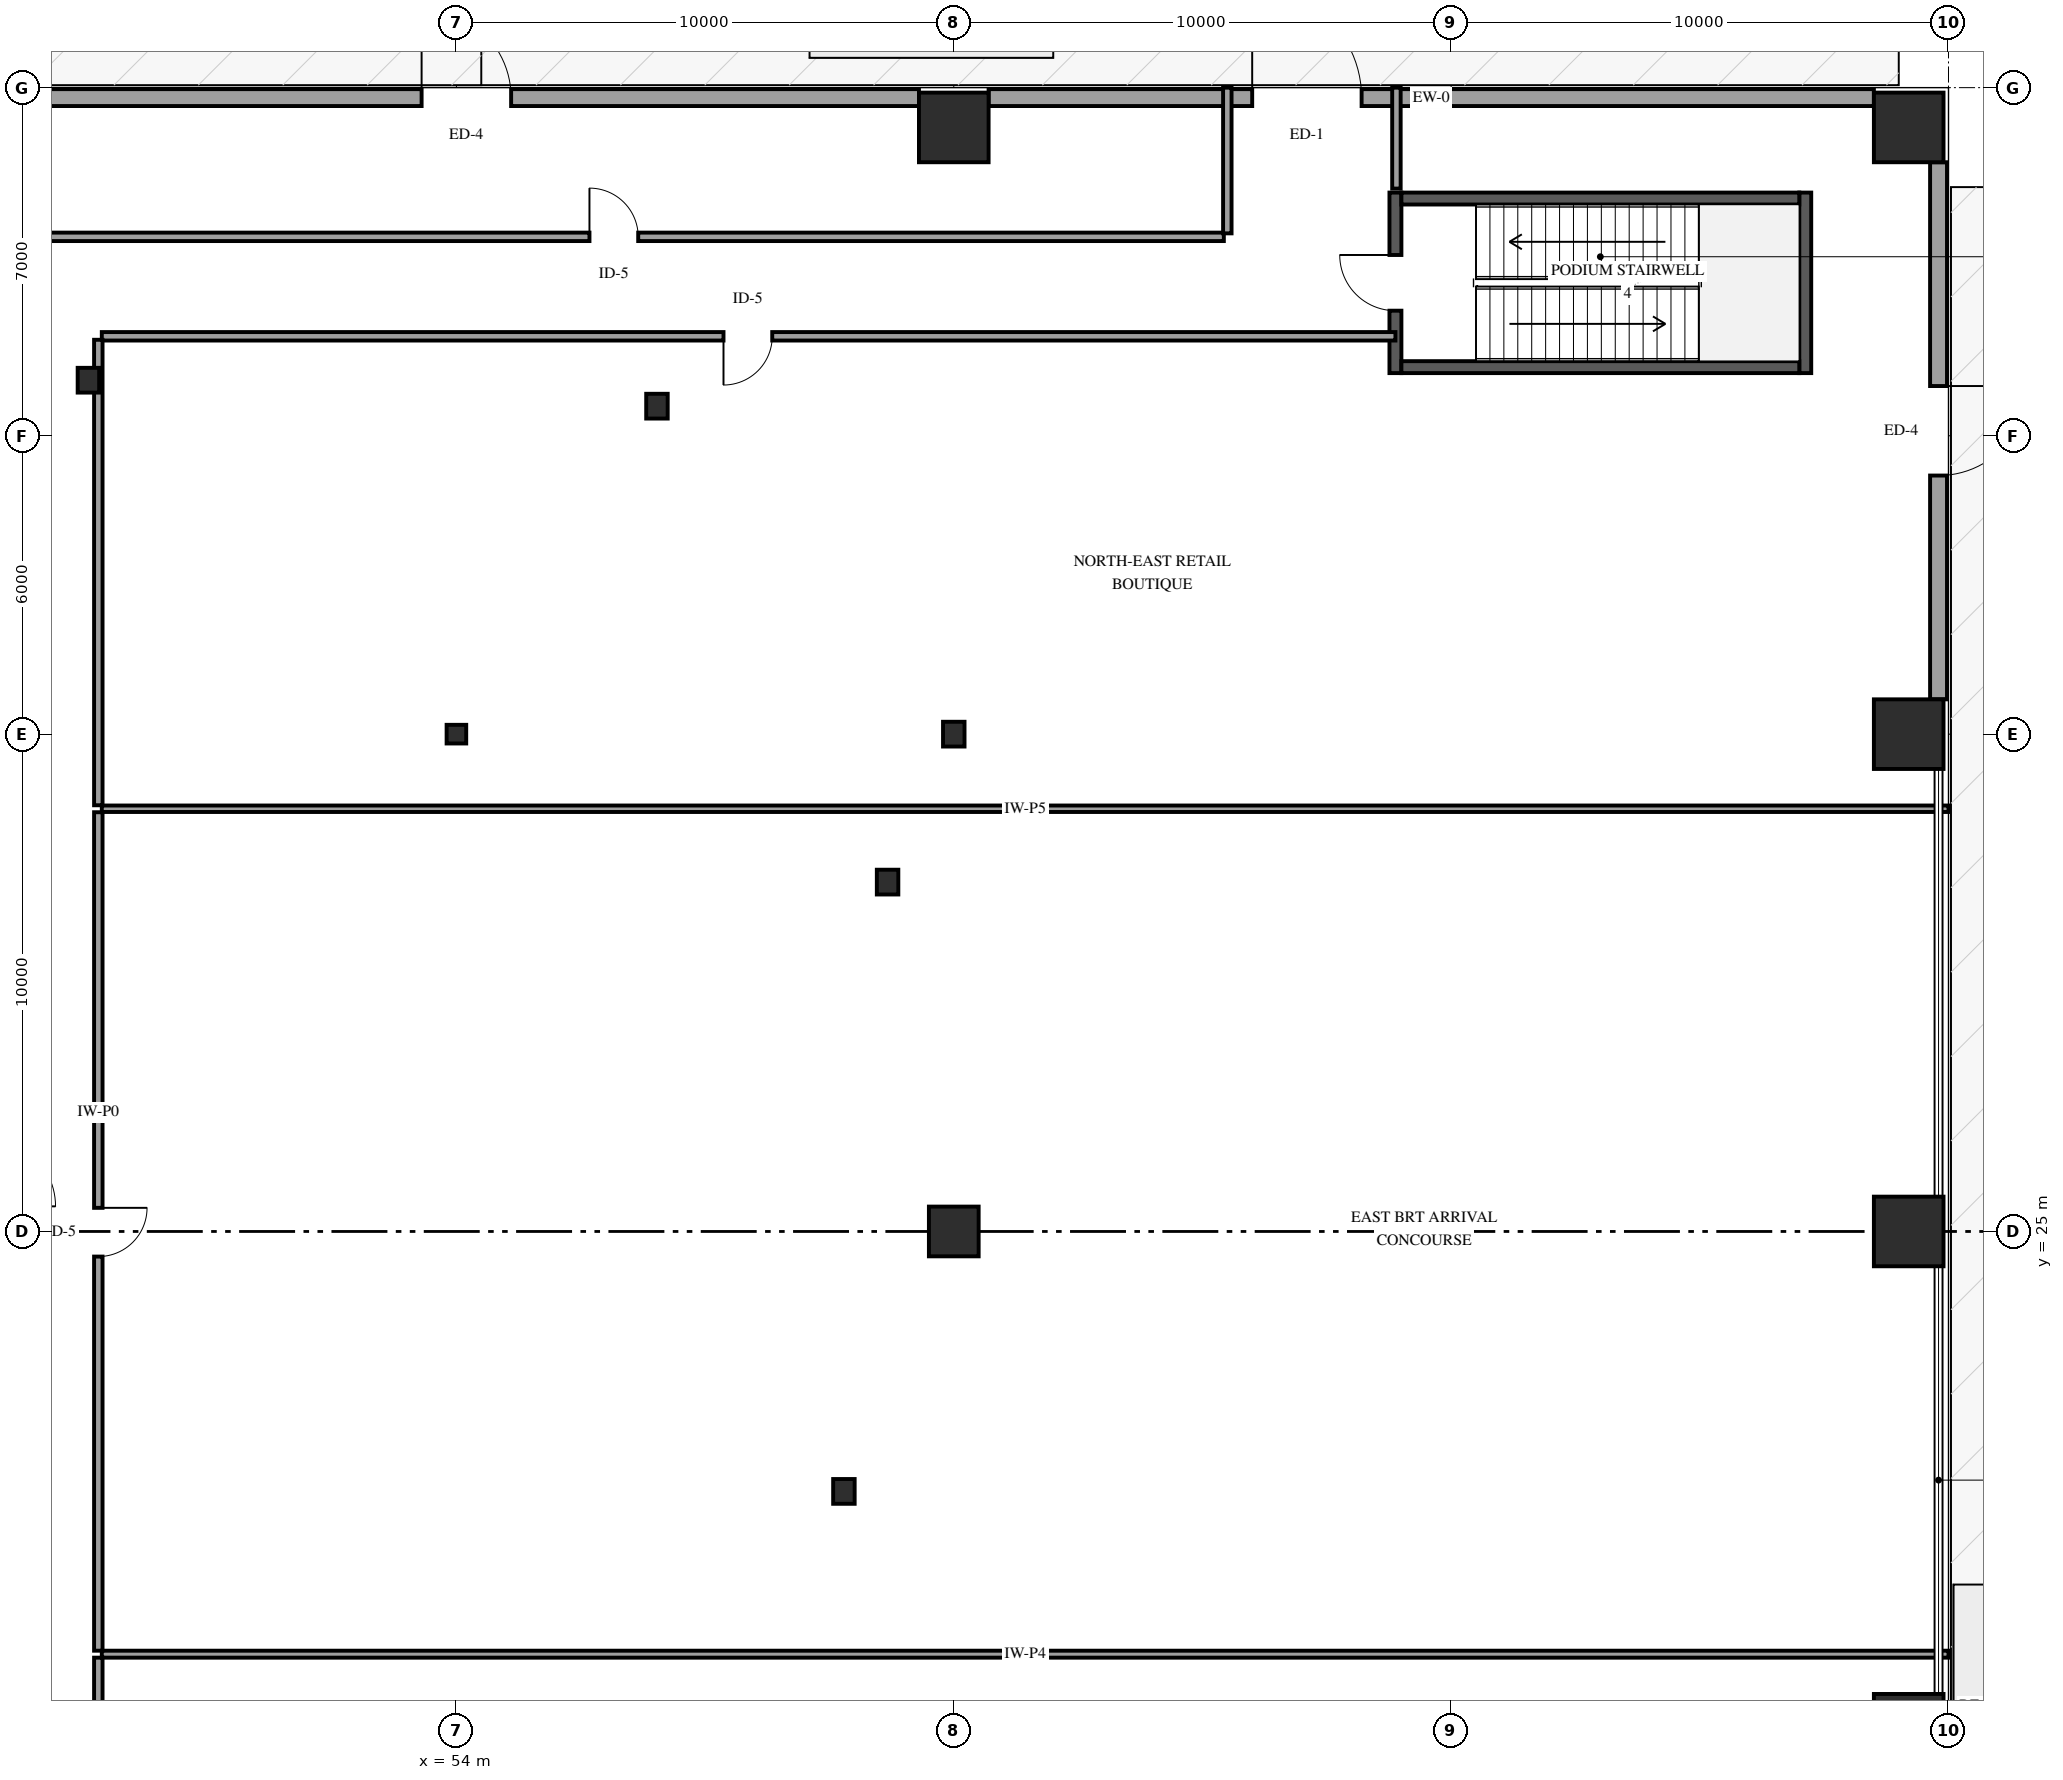
"""IFC4 building model, lengths in metres.
Left out: names, types, materials, properties, quantities, classifications, styles, units other than length and angle.
Written with IfcOpenShell. Run it as: python <this file> out.ifc"""

import sys

from ifc_helpers import new_model, si_unit, direction, frame, frame_2d, origin, origin_2d, place, context, subcontext, project, spatial, rectangle, i_section, extrude, element, fill, save


model = new_model("IFC4")
c1 = context("Model", 3, precision=1e-05, world=origin(), true_north=direction((0.0, 1.0)))
c2 = subcontext(c1, "Body", "Model", "MODEL_VIEW")
j1 = project(units=[si_unit("LENGTHUNIT", "METRE"), si_unit("PLANEANGLEUNIT", "RADIAN")], contexts=[c1])
p1 = place(None, origin())
s1 = spatial("IfcSite", under=j1, at=p1, CompositionType="ELEMENT")
p2 = place(p1, origin())
s2 = spatial("IfcBuilding", under=s1, at=p2, CompositionType="ELEMENT")
p3 = place(p2, origin())
s3 = spatial("IfcBuildingStorey", under=s2, at=p3, CompositionType="ELEMENT", Elevation=0.0)
p4 = place(p3, frame((72.88, 42.26, 0.0), z_axis=(0.0, 0.0, 1.0), x_axis=(0.0, 1.0, 0.0)))
e1 = element("IfcWall", 1, at=p4, inside=s3, PredefinedType="SHEAR", context=c2, shape_type="SweptSolid", body=[
    extrude(rectangle(XDim=3.63, YDim=0.24, at=frame_2d((1.815, 0.0))), origin(), (0.0, 0.0, 1.0), 6.0),
])
p5 = place(p4, frame((1.255, 0.0, 0.0)))
e2 = element("IfcOpeningElement", 2, at=p5, cuts=e1, PredefinedType="OPENING", context=c2, shape_type="SweptSolid", body=[
    extrude(rectangle(XDim=1.12, YDim=2.15, at=frame_2d((0.56, 1.075))), frame((0.0, 0.13, 0.0), z_axis=(0.0, -1.0, 0.0), x_axis=(1.0, 0.0, 0.0)), (0.0, 0.0, 1.0), 0.26),
])
p6 = place(p3, frame((81.12, 42.26, 0.0), z_axis=(0.0, 0.0, 1.0), x_axis=(0.0, 1.0, 0.0)))
e3 = element("IfcWall", 3, at=p6, inside=s3, PredefinedType="SHEAR", context=c2, shape_type="SweptSolid", body=[
    extrude(rectangle(XDim=3.63, YDim=0.24, at=frame_2d((1.815, 0.0))), origin(), (0.0, 0.0, 1.0), 6.0),
])
for number, where, z_axis, x_axis in (
    (4, (73.0, 42.38, 0.0), (0.0, 0.0, 1.0), (1.0, 0.0, 0.0)),
    (5, (73.0, 45.77, 0.0), (0.0, 0.0, 1.0), (1.0, 0.0, 0.0)),
):
    element("IfcWall", number, at=place(p3, frame(where, z_axis=z_axis, x_axis=x_axis)), inside=s3, PredefinedType="SHEAR", context=c2, shape_type="SweptSolid", body=[
        extrude(rectangle(XDim=8.0, YDim=0.24, at=frame_2d((4.0, 0.0))), origin(), (0.0, 0.0, 1.0), 6.0),
    ])
p7 = place(p3, frame((83.2, 15.0, 0.0), z_axis=(0.0, 0.0, 1.0), x_axis=(1.0, 0.0, 0.0)))
e6 = element("IfcColumn", 6, at=p7, inside=s3, PredefinedType="COLUMN", context=c2, shape_type="SweptSolid", body=[
    extrude(rectangle(XDim=1.4, YDim=1.4, at=origin_2d()), origin(), (0.0, 0.0, 1.0), 6.0),
])
p8 = place(p3, frame((64.0, 35.0, 0.0), z_axis=(0.0, 0.0, 1.0), x_axis=(1.0, 0.0, 0.0)))
e7 = element("IfcColumn", 7, at=p8, inside=s3, PredefinedType="COLUMN", context=c2, shape_type="SweptSolid", body=[
    extrude(i_section(OverallWidth=0.432, OverallDepth=0.498, WebThickness=0.056, FlangeThickness=0.089, FilletRadius=0.038, at=origin_2d()), origin(), (0.0, 0.0, 1.0), 6.0),
])
for number, where, z_axis, x_axis in (
    (8, (83.2, 35.0, 0.0), (0.0, 0.0, 1.0), (1.0, 0.0, 0.0)),
    (9, (64.0, 47.2, 0.0), (0.0, 0.0, 1.0), (1.0, 0.0, 0.0)),
    (10, (83.2, 47.2, 0.0), (0.0, 0.0, 1.0), (1.0, 0.0, 0.0)),
):
    element("IfcColumn", number, at=place(p3, frame(where, z_axis=z_axis, x_axis=x_axis)), inside=s3, PredefinedType="COLUMN", context=c2, shape_type="SweptSolid", body=[
        extrude(rectangle(XDim=1.4, YDim=1.4, at=origin_2d()), origin(), (0.0, 0.0, 1.0), 6.0),
    ])
p9 = place(p3, frame((64.0, 25.0, 0.0), z_axis=(0.0, 0.0, 1.0), x_axis=(1.0, 0.0, 0.0)))
e11 = element("IfcColumn", 11, at=p9, inside=s3, PredefinedType="COLUMN", context=c2, shape_type="SweptSolid", body=[
    extrude(rectangle(XDim=1.0, YDim=1.0, at=origin_2d()), origin(), (0.0, 0.0, 1.0), 6.0),
])
p10 = place(p3, frame((83.2, 25.0, 0.0), z_axis=(0.0, 0.0, 1.0), x_axis=(1.0, 0.0, 0.0)))
e12 = element("IfcColumn", 12, at=p10, inside=s3, PredefinedType="COLUMN", context=c2, shape_type="SweptSolid", body=[
    extrude(rectangle(XDim=1.4, YDim=1.4, at=origin_2d()), origin(), (0.0, 0.0, 1.0), 6.0),
])
p11 = place(p3, frame((54.0, 35.0, 0.0), z_axis=(0.0, 0.0, 1.0), x_axis=(1.0, 0.0, 0.0)))
e13 = element("IfcColumn", 13, at=p11, inside=s3, PredefinedType="COLUMN", context=c2, shape_type="SweptSolid", body=[
    extrude(i_section(OverallWidth=0.394, OverallDepth=0.375, WebThickness=0.017, FlangeThickness=0.028, FilletRadius=0.038, at=origin_2d()), origin(), (0.0, 0.0, 1.0), 6.0),
])
for number, where, z_axis, x_axis in (
    (14, (62.669, 32.025, 0.0), (0.0, 0.0, 1.0), (1.0, 0.0, 0.0)),
    (15, (58.032, 41.595, 0.0), (0.0, 0.0, 1.0), (1.0, 0.0, 0.0)),
    (16, (46.601, 42.117, 0.0), (0.0, 0.0, 1.0), (1.0, 0.0, 0.0)),
    (17, (61.791, 19.773, 0.0), (0.0, 0.0, 1.0), (1.0, 0.0, 0.0)),
):
    element("IfcColumn", number, at=place(p3, frame(where, z_axis=z_axis, x_axis=x_axis)), inside=s3, PredefinedType="COLUMN", context=c2, shape_type="SweptSolid", body=[
        extrude(i_section(OverallWidth=0.432, OverallDepth=0.498, WebThickness=0.056, FlangeThickness=0.089, FilletRadius=0.038, at=origin_2d()), origin(), (0.0, 0.0, 1.0), 6.0),
    ])
p12 = place(p3, frame((45.3, 47.8, 0.0), z_axis=(0.0, 0.0, 1.0), x_axis=(1.0, 0.0, 0.0)))
e18 = element("IfcWall", 18, at=p12, inside=s3, PredefinedType="SOLIDWALL", context=c2, shape_type="SweptSolid", body=[
    extrude(rectangle(XDim=18.0, YDim=0.34, at=frame_2d((9.0, 0.0))), origin(), (0.0, 0.0, 1.0), 4.736),
])
p13 = place(p12, frame((8.0, 0.0, 0.0)))
e19 = element("IfcOpeningElement", 19, at=p13, cuts=e18, PredefinedType="OPENING", context=c2, shape_type="SweptSolid", body=[
    extrude(rectangle(XDim=1.8, YDim=2.3, at=frame_2d((0.9, 1.15))), frame((0.0, 0.18, 0.0), z_axis=(0.0, -1.0, 0.0), x_axis=(1.0, 0.0, 0.0)), (0.0, 0.0, 1.0), 0.36),
])
p14 = place(p3, frame((64.7, 47.8, 0.0), z_axis=(0.0, 0.0, 1.0), x_axis=(1.0, 0.0, 0.0)))
e20 = element("IfcWall", 20, at=p14, inside=s3, PredefinedType="SOLIDWALL", context=c2, shape_type="SweptSolid", body=[
    extrude(rectangle(XDim=17.8, YDim=0.34, at=frame_2d((8.9, 0.0))), origin(), (0.0, 0.0, 1.0), 4.736),
])
p15 = place(p14, frame((5.3, 0.0, 0.0)))
e21 = element("IfcOpeningElement", 21, at=p15, cuts=e20, PredefinedType="OPENING", context=c2, shape_type="SweptSolid", body=[
    extrude(rectangle(XDim=2.2, YDim=2.4, at=frame_2d((1.1, 1.2))), frame((0.0, 0.18, 0.0), z_axis=(0.0, -1.0, 0.0), x_axis=(1.0, 0.0, 0.0)), (0.0, 0.0, 1.0), 0.36),
])
p16 = place(p3, frame((83.8, 46.5, 0.0), z_axis=(0.0, 0.0, 1.0), x_axis=(0.0, -1.0, 0.0)))
e22 = element("IfcWall", 22, at=p16, inside=s3, PredefinedType="SOLIDWALL", context=c2, shape_type="SweptSolid", body=[
    extrude(rectangle(XDim=10.8, YDim=0.34, at=frame_2d((5.4, 0.0))), origin(), (0.0, 0.0, 1.0), 4.736),
])
p17 = place(p16, frame((4.5, 0.0, 0.0)))
e23 = element("IfcOpeningElement", 23, at=p17, cuts=e22, PredefinedType="OPENING", context=c2, shape_type="SweptSolid", body=[
    extrude(rectangle(XDim=1.8, YDim=2.3, at=frame_2d((0.9, 1.15))), frame((0.0, 0.18, 0.0), z_axis=(0.0, -1.0, 0.0), x_axis=(1.0, 0.0, 0.0)), (0.0, 0.0, 1.0), 0.36),
])
p18 = place(p3, frame((46.87, 16.5, 0.0), z_axis=(0.0, 0.0, 1.0), x_axis=(1.0, 0.0, 0.0)))
e24 = element("IfcWall", 24, at=p18, inside=s3, PredefinedType="PARTITIONING", context=c2, shape_type="SweptSolid", body=[
    extrude(rectangle(XDim=37.13, YDim=0.14, at=frame_2d((18.565, 0.0))), origin(), (0.0, 0.0, 1.0), 5.68),
])
p19 = place(p3, frame((46.87, 33.5, 0.0), z_axis=(0.0, 0.0, 1.0), x_axis=(1.0, 0.0, 0.0)))
e25 = element("IfcWall", 25, at=p19, inside=s3, PredefinedType="PARTITIONING", context=c2, shape_type="SweptSolid", body=[
    extrude(rectangle(XDim=37.13, YDim=0.13, at=frame_2d((18.565, 0.0))), origin(), (0.0, 0.0, 1.0), 5.68),
])
p20 = place(p3, frame((72.88, 43.0, 0.0), z_axis=(0.0, 0.0, 1.0), x_axis=(-1.0, 0.0, 0.0)))
e26 = element("IfcWall", 26, at=p20, inside=s3, PredefinedType="PARTITIONING", context=c2, shape_type="SweptSolid", body=[
    extrude(rectangle(XDim=26.01, YDim=0.17, at=frame_2d((13.005, 0.0))), origin(), (0.0, 0.0, 1.0), 5.68),
])
p21 = place(p20, frame((12.53, 0.0, 0.0)))
e27 = element("IfcOpeningElement", 27, at=p21, cuts=e26, PredefinedType="OPENING", context=c2, shape_type="SweptSolid", body=[
    extrude(rectangle(XDim=0.98, YDim=2.15, at=frame_2d((0.49, 1.075))), frame((0.0, 0.095, 0.0), z_axis=(0.0, -1.0, 0.0), x_axis=(1.0, 0.0, 0.0)), (0.0, 0.0, 1.0), 0.19),
])
p22 = place(p3, frame((44.87, 45.0, 0.0), z_axis=(0.0, 0.0, 1.0), x_axis=(1.0, 0.0, 0.0)))
e28 = element("IfcWall", 28, at=p22, inside=s3, PredefinedType="PARTITIONING", context=c2, shape_type="SweptSolid", body=[
    extrude(rectangle(XDim=24.56, YDim=0.17, at=frame_2d((12.28, 0.0))), origin(), (0.0, 0.0, 1.0), 5.68),
])
p23 = place(p22, frame((11.805, 0.0, 0.0)))
e29 = element("IfcOpeningElement", 29, at=p23, cuts=e28, PredefinedType="OPENING", context=c2, shape_type="SweptSolid", body=[
    extrude(rectangle(XDim=0.98, YDim=2.15, at=frame_2d((0.49, 1.075))), frame((0.0, 0.095, 0.0), z_axis=(0.0, -1.0, 0.0), x_axis=(1.0, 0.0, 0.0)), (0.0, 0.0, 1.0), 0.19),
])
p24 = place(p3, frame((46.8, 33.43, 0.0), z_axis=(0.0, 0.0, 1.0), x_axis=(0.0, -1.0, 0.0)))
e30 = element("IfcWall", 30, at=p24, inside=s3, PredefinedType="PARTITIONING", context=c2, shape_type="SweptSolid", body=[
    extrude(rectangle(XDim=16.86, YDim=0.17, at=frame_2d((8.43, 0.0))), origin(), (0.0, 0.0, 1.0), 5.68),
])
p25 = place(p24, frame((7.955, 0.0, 0.0)))
e31 = element("IfcOpeningElement", 31, at=p25, cuts=e30, PredefinedType="OPENING", context=c2, shape_type="SweptSolid", body=[
    extrude(rectangle(XDim=0.98, YDim=2.15, at=frame_2d((0.49, 1.075))), frame((0.0, 0.095, 0.0), z_axis=(0.0, -1.0, 0.0), x_axis=(1.0, 0.0, 0.0)), (0.0, 0.0, 1.0), 0.19),
])
p26 = place(p3, frame((46.8, 42.93, 0.0), z_axis=(0.0, 0.0, 1.0), x_axis=(0.0, -1.0, 0.0)))
e32 = element("IfcWall", 32, at=p26, inside=s3, PredefinedType="PARTITIONING", context=c2, shape_type="SweptSolid", body=[
    extrude(rectangle(XDim=9.36, YDim=0.17, at=frame_2d((4.68, 0.0))), origin(), (0.0, 0.0, 1.0), 5.68),
])
p27 = place(p3, frame((46.8, 16.43, 0.0), z_axis=(0.0, 0.0, 1.0), x_axis=(0.0, -1.0, 0.0)))
e33 = element("IfcWall", 33, at=p27, inside=s3, PredefinedType="PARTITIONING", context=c2, shape_type="SweptSolid", body=[
    extrude(rectangle(XDim=4.56, YDim=0.17, at=frame_2d((2.28, 0.0))), origin(), (0.0, 0.0, 1.0), 5.68),
])
p28 = place(p3, frame((69.5, 45.07, 0.0), z_axis=(0.0, 0.0, 1.0), x_axis=(0.0, 1.0, 0.0)))
e34 = element("IfcWall", 34, at=p28, inside=s3, PredefinedType="PARTITIONING", context=c2, shape_type="SweptSolid", body=[
    extrude(rectangle(XDim=2.93, YDim=0.17, at=frame_2d((1.465, 0.0))), origin(), (0.0, 0.0, 1.0), 5.68),
])
p29 = place(p3, frame((72.9, 48.0, 0.0), z_axis=(0.0, 0.0, 1.0), x_axis=(0.0, -1.0, 0.0)))
e35 = element("IfcWall", 35, at=p29, inside=s3, PredefinedType="PARTITIONING", context=c2, shape_type="SweptSolid", body=[
    extrude(rectangle(XDim=2.03, YDim=0.17, at=frame_2d((1.015, 0.0))), origin(), (0.0, 0.0, 1.0), 5.68),
])
p30 = place(p13, origin())
e36 = element("IfcDoor", 36, at=p30, inside=s3, OperationType="SINGLE_SWING_LEFT", PredefinedType="DOOR", context=c2, shape_type="SweptSolid", body=[
    extrude(rectangle(XDim=1.8, YDim=2.3, at=frame_2d((0.9, 1.15))), frame((0.0, 0.025, 0.0), z_axis=(0.0, -1.0, 0.0), x_axis=(1.0, 0.0, 0.0)), (0.0, 0.0, 1.0), 0.05),
])
fill(e19, e36)
p31 = place(p15, origin())
e37 = element("IfcDoor", 37, at=p31, inside=s3, OperationType="SINGLE_SWING_LEFT", PredefinedType="DOOR", context=c2, shape_type="SweptSolid", body=[
    extrude(rectangle(XDim=2.2, YDim=2.4, at=frame_2d((1.1, 1.2))), frame((0.0, 0.025, 0.0), z_axis=(0.0, -1.0, 0.0), x_axis=(1.0, 0.0, 0.0)), (0.0, 0.0, 1.0), 0.05),
])
fill(e21, e37)
p32 = place(p17, origin())
e38 = element("IfcDoor", 38, at=p32, inside=s3, OperationType="SINGLE_SWING_LEFT", PredefinedType="DOOR", context=c2, shape_type="SweptSolid", body=[
    extrude(rectangle(XDim=1.8, YDim=2.3, at=frame_2d((0.9, 1.15))), frame((0.0, 0.025, 0.0), z_axis=(0.0, -1.0, 0.0), x_axis=(1.0, 0.0, 0.0)), (0.0, 0.0, 1.0), 0.05),
])
fill(e23, e38)
p33 = place(p5, origin())
e39 = element("IfcDoor", 39, at=p33, inside=s3, OperationType="SINGLE_SWING_RIGHT", PredefinedType="DOOR", context=c2, shape_type="SweptSolid", body=[
    extrude(rectangle(XDim=1.12, YDim=2.15, at=frame_2d((0.56, 1.075))), frame((0.0, 0.025, 0.0), z_axis=(0.0, -1.0, 0.0), x_axis=(1.0, 0.0, 0.0)), (0.0, 0.0, 1.0), 0.05),
])
fill(e2, e39)
p34 = place(p21, origin())
e40 = element("IfcDoor", 40, at=p34, inside=s3, OperationType="SINGLE_SWING_RIGHT", PredefinedType="DOOR", context=c2, shape_type="SweptSolid", body=[
    extrude(rectangle(XDim=0.98, YDim=2.15, at=frame_2d((0.49, 1.075))), frame((0.0, 0.025, 0.0), z_axis=(0.0, -1.0, 0.0), x_axis=(1.0, 0.0, 0.0)), (0.0, 0.0, 1.0), 0.05),
])
fill(e27, e40)
p35 = place(p23, origin())
e41 = element("IfcDoor", 41, at=p35, inside=s3, OperationType="SINGLE_SWING_LEFT", PredefinedType="DOOR", context=c2, shape_type="SweptSolid", body=[
    extrude(rectangle(XDim=0.98, YDim=2.15, at=frame_2d((0.49, 1.075))), frame((0.0, 0.025, 0.0), z_axis=(0.0, -1.0, 0.0), x_axis=(1.0, 0.0, 0.0)), (0.0, 0.0, 1.0), 0.05),
])
fill(e29, e41)
p36 = place(p25, origin())
e42 = element("IfcDoor", 42, at=p36, inside=s3, OperationType="SINGLE_SWING_LEFT", PredefinedType="DOOR", context=c2, shape_type="SweptSolid", body=[
    extrude(rectangle(XDim=0.98, YDim=2.15, at=frame_2d((0.49, 1.075))), frame((0.0, 0.025, 0.0), z_axis=(0.0, -1.0, 0.0), x_axis=(1.0, 0.0, 0.0)), (0.0, 0.0, 1.0), 0.05),
])
fill(e31, e42)
save(model, sys.argv[1])
